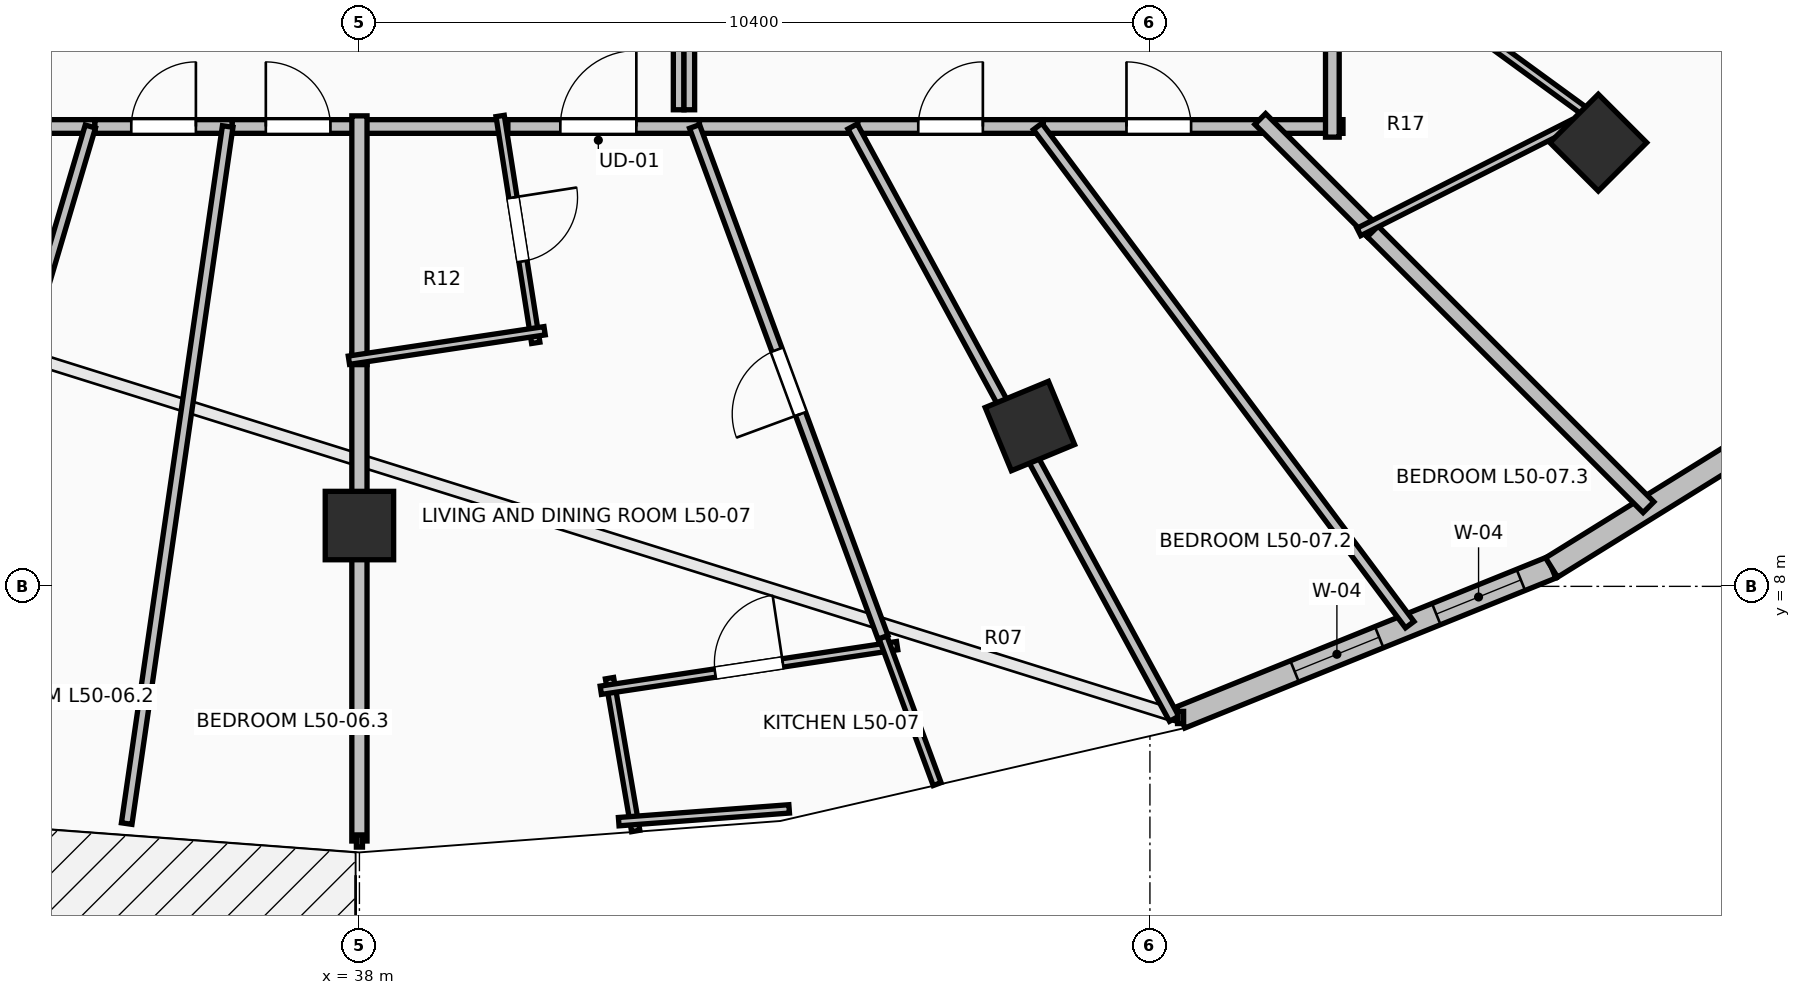
"""IFC4 building model, lengths in metres.
Left out: names, types, materials, properties, quantities, classifications, styles, units other than length and angle.
Written with IfcOpenShell. Run it as: python <this file> out.ifc"""

import sys

from ifc_helpers import new_model, si_unit, direction, frame, frame_2d, origin, origin_2d, place, context, subcontext, project, spatial, rectangle, extrude, element, fill, save


model = new_model("IFC4")
c1 = context("Model", 3, precision=1e-05, world=origin(), true_north=direction((0.0, 1.0)))
c2 = subcontext(c1, "Body", "Model", "MODEL_VIEW")
j1 = project(units=[si_unit("LENGTHUNIT", "METRE"), si_unit("PLANEANGLEUNIT", "RADIAN")], contexts=[c1])
p1 = place(None, origin())
s1 = spatial("IfcSite", under=j1, at=p1, CompositionType="ELEMENT")
p2 = place(p1, origin())
s2 = spatial("IfcBuilding", under=s1, at=p2, CompositionType="ELEMENT")
p3 = place(p2, frame((0.0, 0.0, 186.1)))
s3 = spatial("IfcBuildingStorey", under=s2, at=p3, CompositionType="ELEMENT", Elevation=186.1)
for number, where, z_axis, x_axis in (
    (1, (38.0, 8.8, 0.0), (0.0, 0.0, 1.0), (0.0, -1.0, 0.0)),
    (2, (46.821, 10.109, 0.0), (0.0, 0.0, 1.0), (0.383, -0.924, 0.0)),
    (3, (54.299, 13.838, 0.0), (0.0, 0.0, 1.0), (0.707, -0.707, 0.0)),
):
    element("IfcColumn", number, at=place(p3, frame(where, z_axis=z_axis, x_axis=x_axis)), inside=s3, PredefinedType="COLUMN", context=c2, shape_type="SweptSolid", body=[
        extrude(rectangle(XDim=0.9, YDim=0.9, at=origin_2d()), origin(), (0.0, 0.0, 1.0), 3.5),
    ])
p4 = place(p3, frame((48.803, 6.275, 0.0), z_axis=(0.0, 0.0, 1.0), x_axis=(0.927111094334, 0.374786630981, 0.0)))
e4 = element("IfcWall", 4, at=p4, inside=s3, PredefinedType="STANDARD", context=c2, shape_type="SweptSolid", body=[
    extrude(rectangle(XDim=5.264, YDim=0.3, at=frame_2d((2.632, 0.0))), origin(), (0.0, 0.0, 1.0), 3.24),
])
p5 = place(p4, frame((1.618, 0.0, 0.85)))
e5 = element("IfcOpeningElement", 5, at=p5, cuts=e4, PredefinedType="OPENING", context=c2, shape_type="SweptSolid", body=[
    extrude(rectangle(XDim=1.2, YDim=1.95, at=frame_2d((0.6, 0.975))), frame((0.0, 0.165, 0.0), z_axis=(0.0, -1.0, 0.0), x_axis=(1.0, 0.0, 0.0)), (0.0, 0.0, 1.0), 0.33),
])
p6 = place(p4, frame((3.628, 0.0, 0.85)))
e6 = element("IfcOpeningElement", 6, at=p6, cuts=e4, PredefinedType="OPENING", context=c2, shape_type="SweptSolid", body=[
    extrude(rectangle(XDim=1.2, YDim=1.95, at=frame_2d((0.6, 0.975))), frame((0.0, 0.165, 0.0), z_axis=(0.0, -1.0, 0.0), x_axis=(1.0, 0.0, 0.0)), (0.0, 0.0, 1.0), 0.33),
])
p7 = place(p3, frame((53.684, 8.248, 0.0), z_axis=(0.0, 0.0, 1.0), x_axis=(0.849647657754, 0.527350791858, 0.0)))
e7 = element("IfcWall", 7, at=p7, inside=s3, PredefinedType="STANDARD", context=c2, shape_type="SweptSolid", body=[
    extrude(rectangle(XDim=5.035, YDim=0.3, at=frame_2d((2.518, 0.0))), origin(), (0.0, 0.0, 1.0), 3.24),
])
p8 = place(p3, frame((32.551, 14.05, 0.0), z_axis=(0.0, 0.0, 1.0), x_axis=(1.0, 0.0, 0.0)))
e8 = element("IfcWall", 8, at=p8, inside=s3, PredefinedType="PARTITIONING", context=c2, shape_type="SweptSolid", body=[
    extrude(rectangle(XDim=1.969, YDim=0.18, at=frame_2d((0.984, 0.0))), origin(), (0.0, 0.0, 1.0), 3.24),
])
p9 = place(p3, frame((34.52, 14.05, 0.0), z_axis=(0.0, 0.0, 1.0), x_axis=(1.0, 0.0, 0.0)))
e9 = element("IfcWall", 9, at=p9, inside=s3, PredefinedType="PARTITIONING", context=c2, shape_type="SweptSolid", body=[
    extrude(rectangle(XDim=1.807, YDim=0.18, at=frame_2d((0.903, 0.0))), origin(), (0.0, 0.0, 1.0), 3.24),
])
p10 = place(p9, frame((0.479, 0.0, 0.0)))
e10 = element("IfcOpeningElement", 10, at=p10, cuts=e9, PredefinedType="OPENING", context=c2, shape_type="SweptSolid", body=[
    extrude(rectangle(XDim=0.85, YDim=2.1, at=frame_2d((0.425, 1.05))), frame((0.0, 0.105, 0.0), z_axis=(0.0, -1.0, 0.0), x_axis=(1.0, 0.0, 0.0)), (0.0, 0.0, 1.0), 0.21),
])
p11 = place(p3, frame((36.327, 14.05, 0.0), z_axis=(0.0, 0.0, 1.0), x_axis=(1.0, 0.0, 0.0)))
e11 = element("IfcWall", 11, at=p11, inside=s3, PredefinedType="PARTITIONING", context=c2, shape_type="SweptSolid", body=[
    extrude(rectangle(XDim=1.733, YDim=0.18, at=frame_2d((0.867, 0.0))), origin(), (0.0, 0.0, 1.0), 2.922),
])
p12 = place(p11, frame((0.441, 0.0, 0.0)))
e12 = element("IfcOpeningElement", 12, at=p12, cuts=e11, PredefinedType="OPENING", context=c2, shape_type="SweptSolid", body=[
    extrude(rectangle(XDim=0.85, YDim=2.1, at=frame_2d((0.425, 1.05))), frame((0.0, 0.105, 0.0), z_axis=(0.0, -1.0, 0.0), x_axis=(1.0, 0.0, 0.0)), (0.0, 0.0, 1.0), 0.21),
])
p13 = place(p3, frame((39.813, 14.05, 0.0), z_axis=(0.0, 0.0, 1.0), x_axis=(1.0, 0.0, 0.0)))
e13 = element("IfcWall", 13, at=p13, inside=s3, PredefinedType="PARTITIONING", context=c2, shape_type="SweptSolid", body=[
    extrude(rectangle(XDim=2.66, YDim=0.18, at=frame_2d((1.33, 0.0))), origin(), (0.0, 0.0, 1.0), 2.922),
])
p14 = place(p13, frame((0.83, 0.0, 0.0)))
e14 = element("IfcOpeningElement", 14, at=p14, cuts=e13, PredefinedType="OPENING", context=c2, shape_type="SweptSolid", body=[
    extrude(rectangle(XDim=1.0, YDim=2.15, at=frame_2d((0.5, 1.075))), frame((0.0, 0.105, 0.0), z_axis=(0.0, -1.0, 0.0), x_axis=(1.0, 0.0, 0.0)), (0.0, 0.0, 1.0), 0.21),
])
p15 = place(p3, frame((37.92, 14.05, 0.0), z_axis=(0.0, 0.0, 1.0), x_axis=(1.0, 0.0, 0.0)))
e15 = element("IfcWall", 15, at=p15, inside=s3, PredefinedType="PARTITIONING", context=c2, shape_type="SweptSolid", body=[
    extrude(rectangle(XDim=2.033, YDim=0.18, at=frame_2d((1.017, 0.0))), origin(), (0.0, 0.0, 1.0), 2.922),
])
p16 = place(p3, frame((42.473, 14.05, 0.0), z_axis=(0.0, 0.0, 1.0), x_axis=(1.0, 0.0, 0.0)))
e16 = element("IfcWall", 16, at=p16, inside=s3, PredefinedType="PARTITIONING", context=c2, shape_type="SweptSolid", body=[
    extrude(rectangle(XDim=2.083, YDim=0.18, at=frame_2d((1.042, 0.0))), origin(), (0.0, 0.0, 1.0), 2.922),
])
p17 = place(p3, frame((44.556, 14.05, 0.0), z_axis=(0.0, 0.0, 1.0), x_axis=(1.0, 0.0, 0.0)))
e17 = element("IfcWall", 17, at=p17, inside=s3, PredefinedType="PARTITIONING", context=c2, shape_type="SweptSolid", body=[
    extrude(rectangle(XDim=2.442, YDim=0.18, at=frame_2d((1.221, 0.0))), origin(), (0.0, 0.0, 1.0), 2.432),
])
p18 = place(p17, frame((0.796, 0.0, 0.0)))
e18 = element("IfcOpeningElement", 18, at=p18, cuts=e17, PredefinedType="OPENING", context=c2, shape_type="SweptSolid", body=[
    extrude(rectangle(XDim=0.85, YDim=2.1, at=frame_2d((0.425, 1.05))), frame((0.0, 0.105, 0.0), z_axis=(0.0, -1.0, 0.0), x_axis=(1.0, 0.0, 0.0)), (0.0, 0.0, 1.0), 0.21),
])
p19 = place(p3, frame((46.998, 14.05, 0.0), z_axis=(0.0, 0.0, 1.0), x_axis=(1.0, 0.0, 0.0)))
e19 = element("IfcWall", 19, at=p19, inside=s3, PredefinedType="PARTITIONING", context=c2, shape_type="SweptSolid", body=[
    extrude(rectangle(XDim=3.037, YDim=0.18, at=frame_2d((1.519, 0.0))), origin(), (0.0, 0.0, 1.0), 2.432),
])
p20 = place(p19, frame((1.094, 0.0, 0.0)))
e20 = element("IfcOpeningElement", 20, at=p20, cuts=e19, PredefinedType="OPENING", context=c2, shape_type="SweptSolid", body=[
    extrude(rectangle(XDim=0.85, YDim=2.1, at=frame_2d((0.425, 1.05))), frame((0.0, 0.105, 0.0), z_axis=(0.0, -1.0, 0.0), x_axis=(1.0, 0.0, 0.0)), (0.0, 0.0, 1.0), 0.21),
])
p21 = place(p3, frame((49.895, 14.05, 0.0), z_axis=(0.0, 0.0, 1.0), x_axis=(1.0, 0.0, 0.0)))
e21 = element("IfcWall", 21, at=p21, inside=s3, PredefinedType="PARTITIONING", context=c2, shape_type="SweptSolid", body=[
    extrude(rectangle(XDim=1.045, YDim=0.18, at=frame_2d((0.522, 0.0))), origin(), (0.0, 0.0, 1.0), 2.874),
])
p22 = place(p3, frame((50.8, 13.91, 0.0), z_axis=(0.0, 0.0, 1.0), x_axis=(0.0, 1.0, 0.0)))
e22 = element("IfcWall", 22, at=p22, inside=s3, PredefinedType="PARTITIONING", context=c2, shape_type="SweptSolid", body=[
    extrude(rectangle(XDim=2.826, YDim=0.18, at=frame_2d((1.413, 0.0))), origin(), (0.0, 0.0, 1.0), 2.432),
])
p23 = place(p3, frame((31.842, 5.21, 0.0), z_axis=(0.0, 0.0, 1.0), x_axis=(0.283952183478, 0.958838441813, 0.0)))
e23 = element("IfcWall", 23, at=p23, inside=s3, PredefinedType="PARTITIONING", context=c2, shape_type="SweptSolid", body=[
    extrude(rectangle(XDim=9.219, YDim=0.14, at=frame_2d((4.61, 0.0))), origin(), (0.0, 0.0, 1.0), 2.774),
])
p24 = place(p3, frame((34.938, 4.879, 0.0), z_axis=(0.0, 0.0, 1.0), x_axis=(0.143423836858, 0.989661357749, 0.0)))
e24 = element("IfcWall", 24, at=p24, inside=s3, PredefinedType="PARTITIONING", context=c2, shape_type="SweptSolid", body=[
    extrude(rectangle(XDim=9.267, YDim=0.14, at=frame_2d((4.633, 0.0))), origin(), (0.0, 0.0, 1.0), 2.774),
])
p25 = place(p3, frame((38.0, 4.65, 0.0), z_axis=(0.0, 0.0, 1.0), x_axis=(0.0, 1.0, 0.0)))
e25 = element("IfcWall", 25, at=p25, inside=s3, PredefinedType="PARTITIONING", context=c2, shape_type="SweptSolid", body=[
    extrude(rectangle(XDim=6.407, YDim=0.2, at=frame_2d((3.204, 0.0))), origin(), (0.0, 0.0, 1.0), 3.24),
])
p26 = place(p3, frame((38.0, 10.917, 0.0), z_axis=(0.0, 0.0, 1.0), x_axis=(0.0, 1.0, 0.0)))
e26 = element("IfcWall", 26, at=p26, inside=s3, PredefinedType="PARTITIONING", context=c2, shape_type="SweptSolid", body=[
    extrude(rectangle(XDim=3.273, YDim=0.2, at=frame_2d((1.636, 0.0))), origin(), (0.0, 0.0, 1.0), 2.874),
])
p27 = place(p3, frame((39.851, 14.188, 0.0), z_axis=(0.0, 0.0, 1.0), x_axis=(0.154995605388, -0.98791515947, 0.0)))
e27 = element("IfcWall", 27, at=p27, inside=s3, PredefinedType="PARTITIONING", context=c2, shape_type="SweptSolid", body=[
    extrude(rectangle(XDim=3.021, YDim=0.11, at=frame_2d((1.511, 0.0))), origin(), (0.0, 0.0, 1.0), 2.874),
])
p28 = place(p27, frame((1.086, 0.0, 0.0)))
e28 = element("IfcOpeningElement", 28, at=p28, cuts=e27, PredefinedType="OPENING", context=c2, shape_type="SweptSolid", body=[
    extrude(rectangle(XDim=0.85, YDim=2.1, at=frame_2d((0.425, 1.05))), frame((0.0, 0.07, 0.0), z_axis=(0.0, -1.0, 0.0), x_axis=(1.0, 0.0, 0.0)), (0.0, 0.0, 1.0), 0.14),
])
p29 = place(p3, frame((40.436, 11.363, 0.0), z_axis=(0.0, 0.0, 1.0), x_axis=(-0.988852287037, -0.148899813371, 0.0)))
e29 = element("IfcWall", 29, at=p29, inside=s3, PredefinedType="PARTITIONING", context=c2, shape_type="SweptSolid", body=[
    extrude(rectangle(XDim=2.604, YDim=0.11, at=frame_2d((1.302, 0.0))), origin(), (0.0, 0.0, 1.0), 3.24),
])
p30 = place(p3, frame((41.635, 4.782, 0.0), z_axis=(0.0, 0.0, 1.0), x_axis=(-0.168804313657, 0.985649584635, 0.0)))
e30 = element("IfcWall", 30, at=p30, inside=s3, PredefinedType="PARTITIONING", context=c2, shape_type="SweptSolid", body=[
    extrude(rectangle(XDim=2.039, YDim=0.11, at=frame_2d((1.02, 0.0))), origin(), (0.0, 0.0, 1.0), 3.24),
])
p31 = place(p3, frame((41.176, 6.633, 0.0), z_axis=(0.0, 0.0, 1.0), x_axis=(0.988877230123, 0.148734070555, 0.0)))
e31 = element("IfcWall", 31, at=p31, inside=s3, PredefinedType="PARTITIONING", context=c2, shape_type="SweptSolid", body=[
    extrude(rectangle(XDim=3.943, YDim=0.11, at=frame_2d((1.971, 0.0))), origin(), (0.0, 0.0, 1.0), 3.24),
])
p32 = place(p31, frame((1.521, 0.0, 0.0)))
e32 = element("IfcOpeningElement", 32, at=p32, cuts=e31, PredefinedType="OPENING", context=c2, shape_type="SweptSolid", body=[
    extrude(rectangle(XDim=0.9, YDim=2.1, at=frame_2d((0.45, 1.05))), frame((0.0, 0.07, 0.0), z_axis=(0.0, -1.0, 0.0), x_axis=(1.0, 0.0, 0.0)), (0.0, 0.0, 1.0), 0.14),
])
p33 = place(p3, frame((44.887, 7.33, 0.0), z_axis=(0.0, 0.0, 1.0), x_axis=(0.346337161188, -0.938110105894, 0.0)))
e33 = element("IfcWall", 33, at=p33, inside=s3, PredefinedType="PARTITIONING", context=c2, shape_type="SweptSolid", body=[
    extrude(rectangle(XDim=2.059, YDim=0.11, at=frame_2d((1.03, 0.0))), origin(), (0.0, 0.0, 1.0), 3.24),
])
p34 = place(p3, frame((41.411, 4.905, 0.0), z_axis=(0.0, 0.0, 1.0), x_axis=(0.997205784552, 0.074703569226, 0.0)))
e34 = element("IfcWall", 34, at=p34, inside=s3, PredefinedType="PARTITIONING", context=c2, shape_type="SweptSolid", body=[
    extrude(rectangle(XDim=2.249, YDim=0.11, at=frame_2d((1.124, 0.0))), origin(), (0.0, 0.0, 1.0), 3.24),
])
p35 = place(p3, frame((44.888, 7.33, 0.0), z_axis=(0.0, 0.0, 1.0), x_axis=(-0.346082862485, 0.938203950266, 0.0)))
e35 = element("IfcWall", 35, at=p35, inside=s3, PredefinedType="PARTITIONING", context=c2, shape_type="SweptSolid", body=[
    extrude(rectangle(XDim=7.162, YDim=0.14, at=frame_2d((3.581, 0.0))), origin(), (0.0, 0.0, 1.0), 2.432),
])
p36 = place(p35, frame((3.131, 0.0, 0.0)))
e36 = element("IfcOpeningElement", 36, at=p36, cuts=e35, PredefinedType="OPENING", context=c2, shape_type="SweptSolid", body=[
    extrude(rectangle(XDim=0.9, YDim=2.1, at=frame_2d((0.45, 1.05))), frame((0.0, 0.085, 0.0), z_axis=(0.0, -1.0, 0.0), x_axis=(1.0, 0.0, 0.0)), (0.0, 0.0, 1.0), 0.17),
])
p37 = place(p3, frame((48.719, 6.258, 0.0), z_axis=(0.0, 0.0, 1.0), x_axis=(-0.477180576465, 0.878805267078, 0.0)))
e37 = element("IfcWall", 37, at=p37, inside=s3, PredefinedType="PARTITIONING", context=c2, shape_type="SweptSolid", body=[
    extrude(rectangle(XDim=8.866, YDim=0.14, at=frame_2d((4.433, 0.0))), origin(), (0.0, 0.0, 1.0), 2.432),
])
p38 = place(p3, frame((51.818, 7.496, 0.0), z_axis=(0.0, 0.0, 1.0), x_axis=(-0.598399090147, 0.801198183292, 0.0)))
e38 = element("IfcWall", 38, at=p38, inside=s3, PredefinedType="PARTITIONING", context=c2, shape_type="SweptSolid", body=[
    extrude(rectangle(XDim=8.18, YDim=0.14, at=frame_2d((4.09, 0.0))), origin(), (0.0, 0.0, 1.0), 2.432),
])
p39 = place(p3, frame((54.959, 9.041, 0.0), z_axis=(0.0, 0.0, 1.0), x_axis=(-0.707106781187, 0.707106781187, 0.0)))
e39 = element("IfcWall", 39, at=p39, inside=s3, PredefinedType="PARTITIONING", context=c2, shape_type="SweptSolid", body=[
    extrude(rectangle(XDim=5.271, YDim=0.2, at=frame_2d((2.635, 0.0))), origin(), (0.0, 0.0, 1.0), 2.774),
])
p40 = place(p3, frame((51.331, 12.669, 0.0), z_axis=(0.0, 0.0, 1.0), x_axis=(-0.707106781187, 0.707106781187, 0.0)))
e40 = element("IfcWall", 40, at=p40, inside=s3, PredefinedType="PARTITIONING", context=c2, shape_type="SweptSolid", body=[
    extrude(rectangle(XDim=2.093, YDim=0.2, at=frame_2d((1.046, 0.0))), origin(), (0.0, 0.0, 1.0), 2.874),
])
p41 = place(p3, frame((50.687, 16.752, 0.0), z_axis=(0.0, 0.0, 1.0), x_axis=(0.808074646764, -0.589080100883, 0.0)))
e41 = element("IfcWall", 41, at=p41, inside=s3, PredefinedType="PARTITIONING", context=c2, shape_type="SweptSolid", body=[
    extrude(rectangle(XDim=4.329, YDim=0.11, at=frame_2d((2.165, 0.0))), origin(), (0.0, 0.0, 1.0), 2.874),
])
p42 = place(p41, frame((1.74, 0.0, 0.0)))
e42 = element("IfcOpeningElement", 42, at=p42, cuts=e41, PredefinedType="OPENING", context=c2, shape_type="SweptSolid", body=[
    extrude(rectangle(XDim=0.85, YDim=2.1, at=frame_2d((0.425, 1.05))), frame((0.0, 0.07, 0.0), z_axis=(0.0, -1.0, 0.0), x_axis=(1.0, 0.0, 0.0)), (0.0, 0.0, 1.0), 0.14),
])
p43 = place(p3, frame((53.964, 14.085, 0.0), z_axis=(0.0, 0.0, 1.0), x_axis=(-0.892546166909, -0.450956028828, 0.0)))
e43 = element("IfcWall", 43, at=p43, inside=s3, PredefinedType="PARTITIONING", context=c2, shape_type="SweptSolid", body=[
    extrude(rectangle(XDim=3.154, YDim=0.11, at=frame_2d((1.577, 0.0))), origin(), (0.0, 0.0, 1.0), 2.432),
])
for number, where, z_axis, x_axis in (
    (44, (42.2, 16.1, 0.0), (0.0, 0.0, 1.0), (0.0, -1.0, 0.0)),
    (45, (42.34, 14.27, 0.0), (0.0, 0.0, 1.0), (0.0, 1.0, 0.0)),
):
    element("IfcWall", number, at=place(p3, frame(where, z_axis=z_axis, x_axis=x_axis)), inside=s3, PredefinedType="PARTITIONING", context=c2, shape_type="SweptSolid", body=[
        extrude(rectangle(XDim=1.83, YDim=0.14, at=frame_2d((0.915, 0.0))), origin(), (0.0, 0.0, 1.0), 2.922),
    ])
p44 = place(p5, origin())
e46 = element("IfcWindow", 46, at=p44, inside=s3, PartitioningType="SINGLE_PANEL", PredefinedType="WINDOW", context=c2, shape_type="SweptSolid", body=[
    extrude(rectangle(XDim=1.2, YDim=1.95, at=frame_2d((0.6, 0.975))), frame((0.0, 0.03, 0.0), z_axis=(0.0, -1.0, 0.0), x_axis=(1.0, 0.0, 0.0)), (0.0, 0.0, 1.0), 0.06),
])
fill(e5, e46)
p45 = place(p6, origin())
e47 = element("IfcWindow", 47, at=p45, inside=s3, PartitioningType="SINGLE_PANEL", PredefinedType="WINDOW", context=c2, shape_type="SweptSolid", body=[
    extrude(rectangle(XDim=1.2, YDim=1.95, at=frame_2d((0.6, 0.975))), frame((0.0, 0.03, 0.0), z_axis=(0.0, -1.0, 0.0), x_axis=(1.0, 0.0, 0.0)), (0.0, 0.0, 1.0), 0.06),
])
fill(e6, e47)
p46 = place(p14, origin())
e48 = element("IfcDoor", 48, at=p46, inside=s3, OperationType="SINGLE_SWING_RIGHT", PredefinedType="DOOR", context=c2, shape_type="SweptSolid", body=[
    extrude(rectangle(XDim=1.0, YDim=2.15, at=frame_2d((0.5, 1.075))), frame((0.0, 0.025, 0.0), z_axis=(0.0, -1.0, 0.0), x_axis=(1.0, 0.0, 0.0)), (0.0, 0.0, 1.0), 0.05),
])
fill(e14, e48)
p47 = place(p28, origin())
e49 = element("IfcDoor", 49, at=p47, inside=s3, OperationType="SINGLE_SWING_LEFT", PredefinedType="DOOR", context=c2, shape_type="SweptSolid", body=[
    extrude(rectangle(XDim=0.85, YDim=2.1, at=frame_2d((0.425, 1.05))), frame((0.0, 0.025, 0.0), z_axis=(0.0, -1.0, 0.0), x_axis=(1.0, 0.0, 0.0)), (0.0, 0.0, 1.0), 0.05),
])
fill(e28, e49)
p48 = place(p32, origin())
e50 = element("IfcDoor", 50, at=p48, inside=s3, OperationType="SINGLE_SWING_RIGHT", PredefinedType="DOOR", context=c2, shape_type="SweptSolid", body=[
    extrude(rectangle(XDim=0.9, YDim=2.1, at=frame_2d((0.45, 1.05))), frame((0.0, 0.025, 0.0), z_axis=(0.0, -1.0, 0.0), x_axis=(1.0, 0.0, 0.0)), (0.0, 0.0, 1.0), 0.05),
])
fill(e32, e50)
p49 = place(p36, origin())
e51 = element("IfcDoor", 51, at=p49, inside=s3, OperationType="SINGLE_SWING_LEFT", PredefinedType="DOOR", context=c2, shape_type="SweptSolid", body=[
    extrude(rectangle(XDim=0.9, YDim=2.1, at=frame_2d((0.45, 1.05))), frame((0.0, 0.025, 0.0), z_axis=(0.0, -1.0, 0.0), x_axis=(1.0, 0.0, 0.0)), (0.0, 0.0, 1.0), 0.05),
])
fill(e36, e51)
p50 = place(p10, origin())
e52 = element("IfcDoor", 52, at=p50, inside=s3, OperationType="SINGLE_SWING_RIGHT", PredefinedType="DOOR", context=c2, shape_type="SweptSolid", body=[
    extrude(rectangle(XDim=0.85, YDim=2.1, at=frame_2d((0.425, 1.05))), frame((0.0, 0.025, 0.0), z_axis=(0.0, -1.0, 0.0), x_axis=(1.0, 0.0, 0.0)), (0.0, 0.0, 1.0), 0.05),
])
fill(e10, e52)
p51 = place(p12, origin())
e53 = element("IfcDoor", 53, at=p51, inside=s3, OperationType="SINGLE_SWING_LEFT", PredefinedType="DOOR", context=c2, shape_type="SweptSolid", body=[
    extrude(rectangle(XDim=0.85, YDim=2.1, at=frame_2d((0.425, 1.05))), frame((0.0, 0.025, 0.0), z_axis=(0.0, -1.0, 0.0), x_axis=(1.0, 0.0, 0.0)), (0.0, 0.0, 1.0), 0.05),
])
fill(e12, e53)
p52 = place(p18, origin())
e54 = element("IfcDoor", 54, at=p52, inside=s3, OperationType="SINGLE_SWING_RIGHT", PredefinedType="DOOR", context=c2, shape_type="SweptSolid", body=[
    extrude(rectangle(XDim=0.85, YDim=2.1, at=frame_2d((0.425, 1.05))), frame((0.0, 0.025, 0.0), z_axis=(0.0, -1.0, 0.0), x_axis=(1.0, 0.0, 0.0)), (0.0, 0.0, 1.0), 0.05),
])
fill(e18, e54)
p53 = place(p20, origin())
e55 = element("IfcDoor", 55, at=p53, inside=s3, OperationType="SINGLE_SWING_LEFT", PredefinedType="DOOR", context=c2, shape_type="SweptSolid", body=[
    extrude(rectangle(XDim=0.85, YDim=2.1, at=frame_2d((0.425, 1.05))), frame((0.0, 0.025, 0.0), z_axis=(0.0, -1.0, 0.0), x_axis=(1.0, 0.0, 0.0)), (0.0, 0.0, 1.0), 0.05),
])
fill(e20, e55)
save(model, sys.argv[1])
